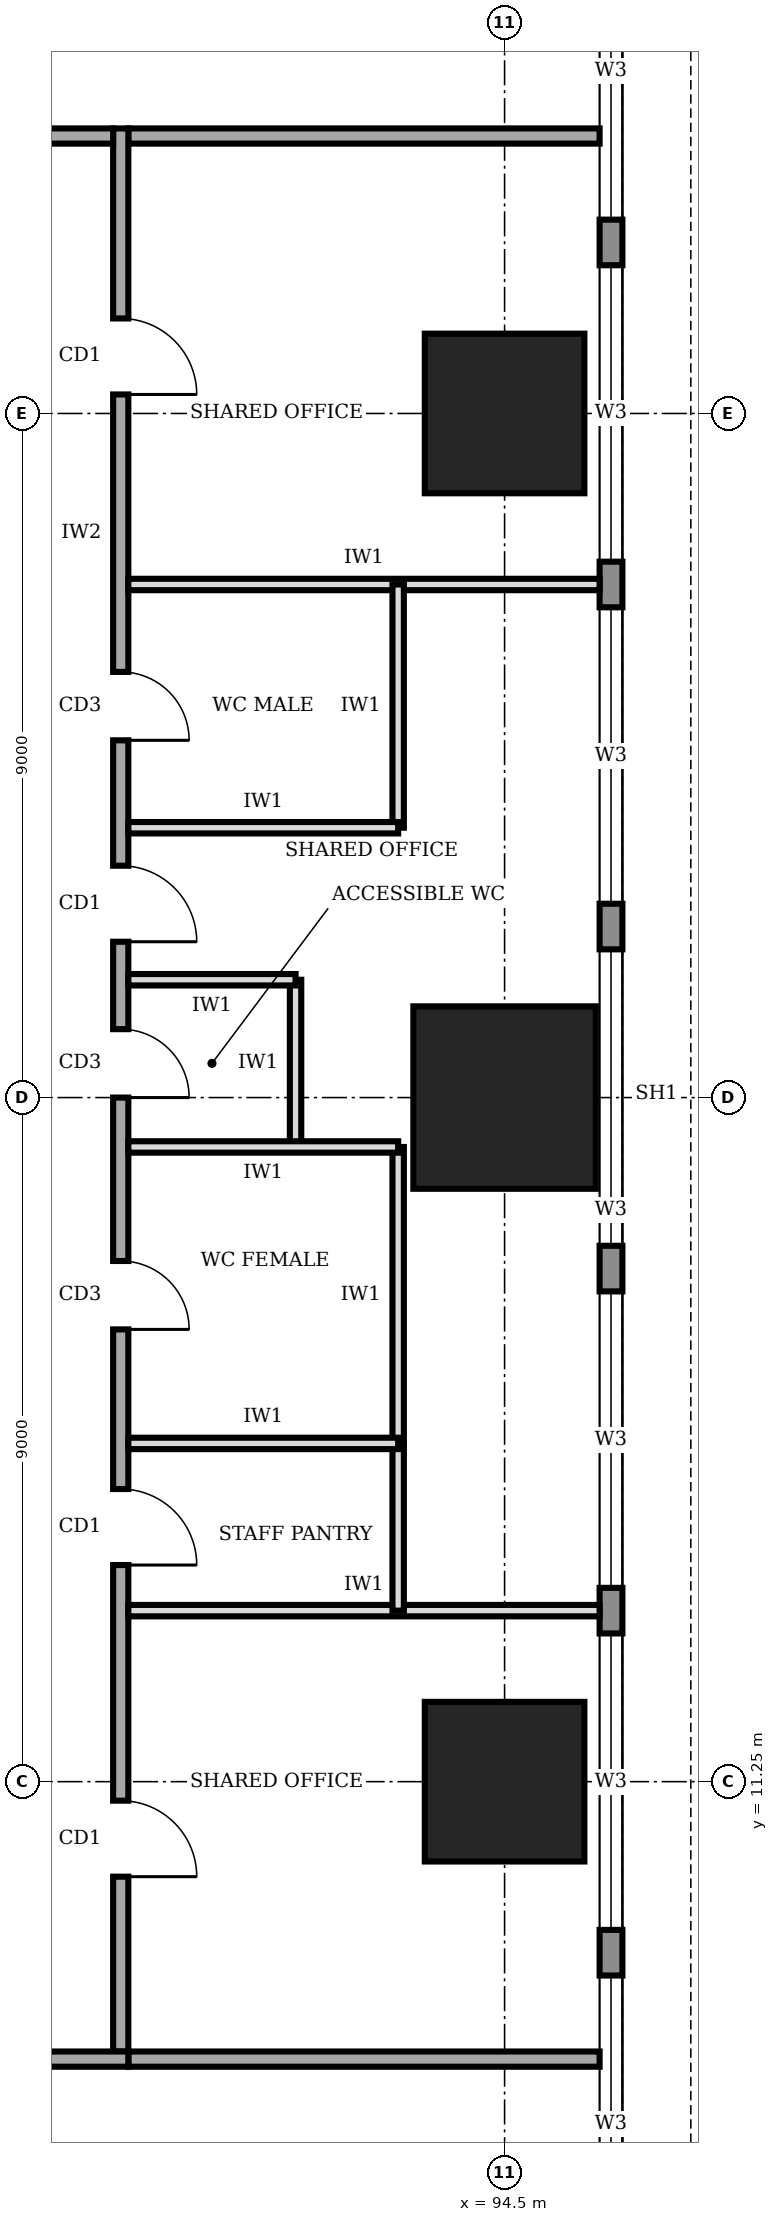
"""IFC4 building model, lengths in metres.
Left out: names, types, materials, properties, quantities, classifications, styles, units other than length and angle.
Written with IfcOpenShell. Run it as: python <this file> out.ifc"""

import sys

from ifc_helpers import new_model, si_unit, direction, frame, frame_2d, origin, origin_2d, place, context, subcontext, project, spatial, rectangle, extrude, element, fill, save


model = new_model("IFC4")
c1 = context("Model", 3, precision=1e-05, world=origin(), true_north=direction((0.0, 1.0)))
c2 = subcontext(c1, "Body", "Model", "MODEL_VIEW")
j1 = project(units=[si_unit("LENGTHUNIT", "METRE"), si_unit("PLANEANGLEUNIT", "RADIAN")], contexts=[c1])
p1 = place(None, origin())
s1 = spatial("IfcSite", under=j1, at=p1, CompositionType="ELEMENT")
p2 = place(p1, origin())
s2 = spatial("IfcBuilding", under=s1, at=p2, CompositionType="ELEMENT")
p3 = place(p2, frame((0.0, 0.0, 85.0)))
s3 = spatial("IfcBuildingStorey", under=s2, at=p3, CompositionType="ELEMENT", Elevation=85.0)
p4 = place(p3, frame((94.5, 11.25, 0.0), z_axis=(0.0, 0.0, 1.0), x_axis=(1.0, 0.0, 0.0)))
e1 = element("IfcColumn", 1, at=p4, inside=s3, PredefinedType="COLUMN", context=c2, shape_type="SweptSolid", body=[
    extrude(rectangle(XDim=2.1, YDim=2.1, at=origin_2d()), origin(), (0.0, 0.0, 1.0), 4.0),
])
p5 = place(p3, frame((94.5, 20.25, 0.0), z_axis=(0.0, 0.0, 1.0), x_axis=(1.0, 0.0, 0.0)))
e2 = element("IfcColumn", 2, at=p5, inside=s3, PredefinedType="COLUMN", context=c2, shape_type="SweptSolid", body=[
    extrude(rectangle(XDim=2.4, YDim=2.4, at=origin_2d()), origin(), (0.0, 0.0, 1.0), 4.0),
])
p6 = place(p3, frame((94.5, 29.25, 0.0), z_axis=(0.0, 0.0, 1.0), x_axis=(1.0, 0.0, 0.0)))
e3 = element("IfcColumn", 3, at=p6, inside=s3, PredefinedType="COLUMN", context=c2, shape_type="SweptSolid", body=[
    extrude(rectangle(XDim=2.1, YDim=2.1, at=origin_2d()), origin(), (0.0, 0.0, 1.0), 4.0),
])
p7 = place(p3, frame((95.9, 3.32, 0.0), z_axis=(0.0, 0.0, 1.0), x_axis=(0.0, 1.0, 0.0)))
e4 = element("IfcWall", 4, at=p7, inside=s3, PredefinedType="STANDARD", context=c2, shape_type="SweptSolid", body=[
    extrude(rectangle(XDim=33.96, YDim=0.3, at=frame_2d((16.98, 0.0))), origin(), (0.0, 0.0, 1.0), 3.75),
])
p8 = place(p7, frame((1.48, 0.0, 0.95)))
e5 = element("IfcOpeningElement", 5, at=p8, cuts=e4, PredefinedType="OPENING", context=c2, shape_type="SweptSolid", body=[
    extrude(rectangle(XDim=3.9, YDim=1.8, at=frame_2d((1.95, 0.9))), frame((0.0, 0.16, 0.0), z_axis=(0.0, -1.0, 0.0), x_axis=(1.0, 0.0, 0.0)), (0.0, 0.0, 1.0), 0.32),
])
p9 = place(p7, frame((5.98, 0.0, 0.95)))
e6 = element("IfcOpeningElement", 6, at=p9, cuts=e4, PredefinedType="OPENING", context=c2, shape_type="SweptSolid", body=[
    extrude(rectangle(XDim=3.9, YDim=1.8, at=frame_2d((1.95, 0.9))), frame((0.0, 0.16, 0.0), z_axis=(0.0, -1.0, 0.0), x_axis=(1.0, 0.0, 0.0)), (0.0, 0.0, 1.0), 0.32),
])
p10 = place(p7, frame((10.48, 0.0, 0.95)))
e7 = element("IfcOpeningElement", 7, at=p10, cuts=e4, PredefinedType="OPENING", context=c2, shape_type="SweptSolid", body=[
    extrude(rectangle(XDim=3.9, YDim=1.8, at=frame_2d((1.95, 0.9))), frame((0.0, 0.16, 0.0), z_axis=(0.0, -1.0, 0.0), x_axis=(1.0, 0.0, 0.0)), (0.0, 0.0, 1.0), 0.32),
])
p11 = place(p7, frame((14.98, 0.0, 0.95)))
e8 = element("IfcOpeningElement", 8, at=p11, cuts=e4, PredefinedType="OPENING", context=c2, shape_type="SweptSolid", body=[
    extrude(rectangle(XDim=3.9, YDim=1.8, at=frame_2d((1.95, 0.9))), frame((0.0, 0.16, 0.0), z_axis=(0.0, -1.0, 0.0), x_axis=(1.0, 0.0, 0.0)), (0.0, 0.0, 1.0), 0.32),
])
p12 = place(p7, frame((19.48, 0.0, 0.95)))
e9 = element("IfcOpeningElement", 9, at=p12, cuts=e4, PredefinedType="OPENING", context=c2, shape_type="SweptSolid", body=[
    extrude(rectangle(XDim=3.9, YDim=1.8, at=frame_2d((1.95, 0.9))), frame((0.0, 0.16, 0.0), z_axis=(0.0, -1.0, 0.0), x_axis=(1.0, 0.0, 0.0)), (0.0, 0.0, 1.0), 0.32),
])
p13 = place(p7, frame((23.98, 0.0, 0.95)))
e10 = element("IfcOpeningElement", 10, at=p13, cuts=e4, PredefinedType="OPENING", context=c2, shape_type="SweptSolid", body=[
    extrude(rectangle(XDim=3.9, YDim=1.8, at=frame_2d((1.95, 0.9))), frame((0.0, 0.16, 0.0), z_axis=(0.0, -1.0, 0.0), x_axis=(1.0, 0.0, 0.0)), (0.0, 0.0, 1.0), 0.32),
])
p14 = place(p7, frame((28.48, 0.0, 0.95)))
e11 = element("IfcOpeningElement", 11, at=p14, cuts=e4, PredefinedType="OPENING", context=c2, shape_type="SweptSolid", body=[
    extrude(rectangle(XDim=3.9, YDim=1.8, at=frame_2d((1.95, 0.9))), frame((0.0, 0.16, 0.0), z_axis=(0.0, -1.0, 0.0), x_axis=(1.0, 0.0, 0.0)), (0.0, 0.0, 1.0), 0.32),
])
p15 = place(p3, frame((63.3, 7.6, 0.0), z_axis=(0.0, 0.0, 1.0), x_axis=(1.0, 0.0, 0.0)))
e12 = element("IfcWall", 12, at=p15, inside=s3, PredefinedType="SOLIDWALL", context=c2, shape_type="SweptSolid", body=[
    extrude(rectangle(XDim=26.25, YDim=0.2, at=frame_2d((13.125, 0.0))), origin(), (0.0, 0.0, 1.0), 3.75),
])
p16 = place(p15, frame((6.0, 0.0, 0.0)))
e13 = element("IfcOpeningElement", 13, at=p16, cuts=e12, PredefinedType="OPENING", context=c2, shape_type="SweptSolid", body=[
    extrude(rectangle(XDim=1.0, YDim=2.1, at=frame_2d((0.5, 1.05))), frame((0.0, 0.11, 0.0), z_axis=(0.0, -1.0, 0.0), x_axis=(1.0, 0.0, 0.0)), (0.0, 0.0, 1.0), 0.22),
])
p17 = place(p15, frame((19.325, 0.0, 0.0)))
e14 = element("IfcOpeningElement", 14, at=p17, cuts=e12, PredefinedType="OPENING", context=c2, shape_type="SweptSolid", body=[
    extrude(rectangle(XDim=1.0, YDim=2.1, at=frame_2d((0.5, 1.05))), frame((0.0, 0.11, 0.0), z_axis=(0.0, -1.0, 0.0), x_axis=(1.0, 0.0, 0.0)), (0.0, 0.0, 1.0), 0.22),
])
p18 = place(p3, frame((89.45, 7.7, 0.0), z_axis=(0.0, 0.0, 1.0), x_axis=(0.0, 1.0, 0.0)))
e15 = element("IfcWall", 15, at=p18, inside=s3, PredefinedType="SOLIDWALL", context=c2, shape_type="SweptSolid", body=[
    extrude(rectangle(XDim=25.3, YDim=0.2, at=frame_2d((12.65, 0.0))), origin(), (0.0, 0.0, 1.0), 3.75),
])
p19 = place(p18, frame((2.3, 0.0, 0.0)))
e16 = element("IfcOpeningElement", 16, at=p19, cuts=e15, PredefinedType="OPENING", context=c2, shape_type="SweptSolid", body=[
    extrude(rectangle(XDim=1.0, YDim=2.1, at=frame_2d((0.5, 1.05))), frame((0.0, 0.11, 0.0), z_axis=(0.0, -1.0, 0.0), x_axis=(1.0, 0.0, 0.0)), (0.0, 0.0, 1.0), 0.22),
])
p20 = place(p18, frame((6.4, 0.0, 0.0)))
e17 = element("IfcOpeningElement", 17, at=p20, cuts=e15, PredefinedType="OPENING", context=c2, shape_type="SweptSolid", body=[
    extrude(rectangle(XDim=1.0, YDim=2.1, at=frame_2d((0.5, 1.05))), frame((0.0, 0.11, 0.0), z_axis=(0.0, -1.0, 0.0), x_axis=(1.0, 0.0, 0.0)), (0.0, 0.0, 1.0), 0.22),
])
p21 = place(p18, frame((9.5, 0.0, 0.0)))
e18 = element("IfcOpeningElement", 18, at=p21, cuts=e15, PredefinedType="OPENING", context=c2, shape_type="SweptSolid", body=[
    extrude(rectangle(XDim=0.9, YDim=2.1, at=frame_2d((0.45, 1.05))), frame((0.0, 0.11, 0.0), z_axis=(0.0, -1.0, 0.0), x_axis=(1.0, 0.0, 0.0)), (0.0, 0.0, 1.0), 0.22),
])
p22 = place(p18, frame((12.55, 0.0, 0.0)))
e19 = element("IfcOpeningElement", 19, at=p22, cuts=e15, PredefinedType="OPENING", context=c2, shape_type="SweptSolid", body=[
    extrude(rectangle(XDim=0.9, YDim=2.1, at=frame_2d((0.45, 1.05))), frame((0.0, 0.11, 0.0), z_axis=(0.0, -1.0, 0.0), x_axis=(1.0, 0.0, 0.0)), (0.0, 0.0, 1.0), 0.22),
])
p23 = place(p18, frame((17.25, 0.0, 0.0)))
e20 = element("IfcOpeningElement", 20, at=p23, cuts=e15, PredefinedType="OPENING", context=c2, shape_type="SweptSolid", body=[
    extrude(rectangle(XDim=0.9, YDim=2.1, at=frame_2d((0.45, 1.05))), frame((0.0, 0.11, 0.0), z_axis=(0.0, -1.0, 0.0), x_axis=(1.0, 0.0, 0.0)), (0.0, 0.0, 1.0), 0.22),
])
p24 = place(p18, frame((14.6, 0.0, 0.0)))
e21 = element("IfcOpeningElement", 21, at=p24, cuts=e15, PredefinedType="OPENING", context=c2, shape_type="SweptSolid", body=[
    extrude(rectangle(XDim=1.0, YDim=2.1, at=frame_2d((0.5, 1.05))), frame((0.0, 0.11, 0.0), z_axis=(0.0, -1.0, 0.0), x_axis=(1.0, 0.0, 0.0)), (0.0, 0.0, 1.0), 0.22),
])
p25 = place(p18, frame((21.8, 0.0, 0.0)))
e22 = element("IfcOpeningElement", 22, at=p25, cuts=e15, PredefinedType="OPENING", context=c2, shape_type="SweptSolid", body=[
    extrude(rectangle(XDim=1.0, YDim=2.1, at=frame_2d((0.5, 1.05))), frame((0.0, 0.11, 0.0), z_axis=(0.0, -1.0, 0.0), x_axis=(1.0, 0.0, 0.0)), (0.0, 0.0, 1.0), 0.22),
])
p26 = place(p3, frame((89.35, 32.9, 0.0), z_axis=(0.0, 0.0, 1.0), x_axis=(-1.0, 0.0, 0.0)))
e23 = element("IfcWall", 23, at=p26, inside=s3, PredefinedType="SOLIDWALL", context=c2, shape_type="SweptSolid", body=[
    extrude(rectangle(XDim=26.05, YDim=0.2, at=frame_2d((13.025, 0.0))), origin(), (0.0, 0.0, 1.0), 3.75),
])
p27 = place(p26, frame((19.05, 0.0, 0.0)))
e24 = element("IfcOpeningElement", 24, at=p27, cuts=e23, PredefinedType="OPENING", context=c2, shape_type="SweptSolid", body=[
    extrude(rectangle(XDim=1.0, YDim=2.1, at=frame_2d((0.5, 1.05))), frame((0.0, 0.11, 0.0), z_axis=(0.0, -1.0, 0.0), x_axis=(1.0, 0.0, 0.0)), (0.0, 0.0, 1.0), 0.22),
])
p28 = place(p26, frame((7.85, 0.0, 0.0)))
e25 = element("IfcOpeningElement", 25, at=p28, cuts=e23, PredefinedType="OPENING", context=c2, shape_type="SweptSolid", body=[
    extrude(rectangle(XDim=1.0, YDim=2.1, at=frame_2d((0.5, 1.05))), frame((0.0, 0.11, 0.0), z_axis=(0.0, -1.0, 0.0), x_axis=(1.0, 0.0, 0.0)), (0.0, 0.0, 1.0), 0.22),
])
p29 = place(p26, frame((1.325, 0.0, 0.0)))
e26 = element("IfcOpeningElement", 26, at=p29, cuts=e23, PredefinedType="OPENING", context=c2, shape_type="SweptSolid", body=[
    extrude(rectangle(XDim=1.0, YDim=2.1, at=frame_2d((0.5, 1.05))), frame((0.0, 0.11, 0.0), z_axis=(0.0, -1.0, 0.0), x_axis=(1.0, 0.0, 0.0)), (0.0, 0.0, 1.0), 0.22),
])
for number, where, z_axis, x_axis in (
    (27, (89.55, 7.6, 0.0), (0.0, 0.0, 1.0), (1.0, 0.0, 0.0)),
    (28, (89.55, 32.9, 0.0), (0.0, 0.0, 1.0), (1.0, 0.0, 0.0)),
):
    element("IfcWall", number, at=place(p3, frame(where, z_axis=z_axis, x_axis=x_axis)), inside=s3, PredefinedType="SOLIDWALL", context=c2, shape_type="SweptSolid", body=[
        extrude(rectangle(XDim=6.2, YDim=0.2, at=frame_2d((3.1, 0.0))), origin(), (0.0, 0.0, 1.0), 3.75),
    ])
for number, where, z_axis, x_axis in (
    (29, (89.55, 13.5, 0.0), (0.0, 0.0, 1.0), (1.0, 0.0, 0.0)),
    (30, (89.55, 27.0, 0.0), (0.0, 0.0, 1.0), (1.0, 0.0, 0.0)),
):
    element("IfcWall", number, at=place(p3, frame(where, z_axis=z_axis, x_axis=x_axis)), inside=s3, PredefinedType="PARTITIONING", context=c2, shape_type="SweptSolid", body=[
        extrude(rectangle(XDim=6.2, YDim=0.15, at=frame_2d((3.1, 0.0))), origin(), (0.0, 0.0, 1.0), 3.75),
    ])
p30 = place(p3, frame((89.55, 15.7, 0.0), z_axis=(0.0, 0.0, 1.0), x_axis=(1.0, 0.0, 0.0)))
e31 = element("IfcWall", 31, at=p30, inside=s3, PredefinedType="PARTITIONING", context=c2, shape_type="SweptSolid", body=[
    extrude(rectangle(XDim=3.55, YDim=0.15, at=frame_2d((1.775, 0.0))), origin(), (0.0, 0.0, 1.0), 3.75),
])
p31 = place(p3, frame((89.55, 19.6, 0.0), z_axis=(0.0, 0.0, 1.0), x_axis=(1.0, 0.0, 0.0)))
e32 = element("IfcWall", 32, at=p31, inside=s3, PredefinedType="PARTITIONING", context=c2, shape_type="SweptSolid", body=[
    extrude(rectangle(XDim=3.55, YDim=0.15, at=frame_2d((1.775, 0.0))), origin(), (0.0, 0.0, 1.0), 2.85),
])
p32 = place(p3, frame((89.55, 21.8, 0.0), z_axis=(0.0, 0.0, 1.0), x_axis=(1.0, 0.0, 0.0)))
e33 = element("IfcWall", 33, at=p32, inside=s3, PredefinedType="PARTITIONING", context=c2, shape_type="SweptSolid", body=[
    extrude(rectangle(XDim=2.2, YDim=0.15, at=frame_2d((1.1, 0.0))), origin(), (0.0, 0.0, 1.0), 3.75),
])
p33 = place(p3, frame((89.55, 23.8, 0.0), z_axis=(0.0, 0.0, 1.0), x_axis=(1.0, 0.0, 0.0)))
e34 = element("IfcWall", 34, at=p33, inside=s3, PredefinedType="PARTITIONING", context=c2, shape_type="SweptSolid", body=[
    extrude(rectangle(XDim=3.55, YDim=0.15, at=frame_2d((1.775, 0.0))), origin(), (0.0, 0.0, 1.0), 3.75),
])
p34 = place(p3, frame((93.1, 13.5, 0.0), z_axis=(0.0, 0.0, 1.0), x_axis=(0.0, 1.0, 0.0)))
e35 = element("IfcWall", 35, at=p34, inside=s3, PredefinedType="PARTITIONING", context=c2, shape_type="SweptSolid", body=[
    extrude(rectangle(XDim=2.2, YDim=0.15, at=frame_2d((1.1, 0.0))), origin(), (0.0, 0.0, 1.0), 3.75),
])
p35 = place(p3, frame((93.1, 15.7, 0.0), z_axis=(0.0, 0.0, 1.0), x_axis=(0.0, 1.0, 0.0)))
e36 = element("IfcWall", 36, at=p35, inside=s3, PredefinedType="PARTITIONING", context=c2, shape_type="SweptSolid", body=[
    extrude(rectangle(XDim=3.9, YDim=0.15, at=frame_2d((1.95, 0.0))), origin(), (0.0, 0.0, 1.0), 3.75),
])
p36 = place(p3, frame((91.75, 19.6, 0.0), z_axis=(0.0, 0.0, 1.0), x_axis=(0.0, 1.0, 0.0)))
e37 = element("IfcWall", 37, at=p36, inside=s3, PredefinedType="PARTITIONING", context=c2, shape_type="SweptSolid", body=[
    extrude(rectangle(XDim=2.2, YDim=0.15, at=frame_2d((1.1, 0.0))), origin(), (0.0, 0.0, 1.0), 3.75),
])
p37 = place(p3, frame((93.1, 23.8, 0.0), z_axis=(0.0, 0.0, 1.0), x_axis=(0.0, 1.0, 0.0)))
e38 = element("IfcWall", 38, at=p37, inside=s3, PredefinedType="PARTITIONING", context=c2, shape_type="SweptSolid", body=[
    extrude(rectangle(XDim=3.2, YDim=0.15, at=frame_2d((1.6, 0.0))), origin(), (0.0, 0.0, 1.0), 3.75),
])
p38 = place(p8, origin())
e39 = element("IfcWindow", 39, at=p38, inside=s3, PartitioningType="SINGLE_PANEL", PredefinedType="WINDOW", context=c2, shape_type="SweptSolid", body=[
    extrude(rectangle(XDim=3.9, YDim=1.8, at=frame_2d((1.95, 0.9))), frame((0.0, 0.03, 0.0), z_axis=(0.0, -1.0, 0.0), x_axis=(1.0, 0.0, 0.0)), (0.0, 0.0, 1.0), 0.06),
])
fill(e5, e39)
p39 = place(p9, origin())
e40 = element("IfcWindow", 40, at=p39, inside=s3, PartitioningType="SINGLE_PANEL", PredefinedType="WINDOW", context=c2, shape_type="SweptSolid", body=[
    extrude(rectangle(XDim=3.9, YDim=1.8, at=frame_2d((1.95, 0.9))), frame((0.0, 0.03, 0.0), z_axis=(0.0, -1.0, 0.0), x_axis=(1.0, 0.0, 0.0)), (0.0, 0.0, 1.0), 0.06),
])
fill(e6, e40)
p40 = place(p10, origin())
e41 = element("IfcWindow", 41, at=p40, inside=s3, PartitioningType="SINGLE_PANEL", PredefinedType="WINDOW", context=c2, shape_type="SweptSolid", body=[
    extrude(rectangle(XDim=3.9, YDim=1.8, at=frame_2d((1.95, 0.9))), frame((0.0, 0.03, 0.0), z_axis=(0.0, -1.0, 0.0), x_axis=(1.0, 0.0, 0.0)), (0.0, 0.0, 1.0), 0.06),
])
fill(e7, e41)
p41 = place(p11, origin())
e42 = element("IfcWindow", 42, at=p41, inside=s3, PartitioningType="SINGLE_PANEL", PredefinedType="WINDOW", context=c2, shape_type="SweptSolid", body=[
    extrude(rectangle(XDim=3.9, YDim=1.8, at=frame_2d((1.95, 0.9))), frame((0.0, 0.03, 0.0), z_axis=(0.0, -1.0, 0.0), x_axis=(1.0, 0.0, 0.0)), (0.0, 0.0, 1.0), 0.06),
])
fill(e8, e42)
p42 = place(p12, origin())
e43 = element("IfcWindow", 43, at=p42, inside=s3, PartitioningType="SINGLE_PANEL", PredefinedType="WINDOW", context=c2, shape_type="SweptSolid", body=[
    extrude(rectangle(XDim=3.9, YDim=1.8, at=frame_2d((1.95, 0.9))), frame((0.0, 0.03, 0.0), z_axis=(0.0, -1.0, 0.0), x_axis=(1.0, 0.0, 0.0)), (0.0, 0.0, 1.0), 0.06),
])
fill(e9, e43)
p43 = place(p13, origin())
e44 = element("IfcWindow", 44, at=p43, inside=s3, PartitioningType="SINGLE_PANEL", PredefinedType="WINDOW", context=c2, shape_type="SweptSolid", body=[
    extrude(rectangle(XDim=3.9, YDim=1.8, at=frame_2d((1.95, 0.9))), frame((0.0, 0.03, 0.0), z_axis=(0.0, -1.0, 0.0), x_axis=(1.0, 0.0, 0.0)), (0.0, 0.0, 1.0), 0.06),
])
fill(e10, e44)
p44 = place(p14, origin())
e45 = element("IfcWindow", 45, at=p44, inside=s3, PartitioningType="SINGLE_PANEL", PredefinedType="WINDOW", context=c2, shape_type="SweptSolid", body=[
    extrude(rectangle(XDim=3.9, YDim=1.8, at=frame_2d((1.95, 0.9))), frame((0.0, 0.03, 0.0), z_axis=(0.0, -1.0, 0.0), x_axis=(1.0, 0.0, 0.0)), (0.0, 0.0, 1.0), 0.06),
])
fill(e11, e45)
p45 = place(p19, frame((1.0, 0.0, 0.0), z_axis=(0.0, 0.0, 1.0), x_axis=(-1.0, 0.0, 0.0)))
e46 = element("IfcDoor", 46, at=p45, inside=s3, OperationType="SINGLE_SWING_RIGHT", PredefinedType="DOOR", context=c2, shape_type="SweptSolid", body=[
    extrude(rectangle(XDim=1.0, YDim=2.1, at=frame_2d((0.5, 1.05))), frame((0.0, 0.025, 0.0), z_axis=(0.0, -1.0, 0.0), x_axis=(1.0, 0.0, 0.0)), (0.0, 0.0, 1.0), 0.05),
])
fill(e16, e46)
p46 = place(p20, frame((1.0, 0.0, 0.0), z_axis=(0.0, 0.0, 1.0), x_axis=(-1.0, 0.0, 0.0)))
e47 = element("IfcDoor", 47, at=p46, inside=s3, OperationType="SINGLE_SWING_RIGHT", PredefinedType="DOOR", context=c2, shape_type="SweptSolid", body=[
    extrude(rectangle(XDim=1.0, YDim=2.1, at=frame_2d((0.5, 1.05))), frame((0.0, 0.025, 0.0), z_axis=(0.0, -1.0, 0.0), x_axis=(1.0, 0.0, 0.0)), (0.0, 0.0, 1.0), 0.05),
])
fill(e17, e47)
p47 = place(p21, frame((0.9, 0.0, 0.0), z_axis=(0.0, 0.0, 1.0), x_axis=(-1.0, 0.0, 0.0)))
e48 = element("IfcDoor", 48, at=p47, inside=s3, OperationType="SINGLE_SWING_RIGHT", PredefinedType="DOOR", context=c2, shape_type="SweptSolid", body=[
    extrude(rectangle(XDim=0.9, YDim=2.1, at=frame_2d((0.45, 1.05))), frame((0.0, 0.025, 0.0), z_axis=(0.0, -1.0, 0.0), x_axis=(1.0, 0.0, 0.0)), (0.0, 0.0, 1.0), 0.05),
])
fill(e18, e48)
p48 = place(p22, frame((0.9, 0.0, 0.0), z_axis=(0.0, 0.0, 1.0), x_axis=(-1.0, 0.0, 0.0)))
e49 = element("IfcDoor", 49, at=p48, inside=s3, OperationType="SINGLE_SWING_RIGHT", PredefinedType="DOOR", context=c2, shape_type="SweptSolid", body=[
    extrude(rectangle(XDim=0.9, YDim=2.1, at=frame_2d((0.45, 1.05))), frame((0.0, 0.025, 0.0), z_axis=(0.0, -1.0, 0.0), x_axis=(1.0, 0.0, 0.0)), (0.0, 0.0, 1.0), 0.05),
])
fill(e19, e49)
p49 = place(p23, frame((0.9, 0.0, 0.0), z_axis=(0.0, 0.0, 1.0), x_axis=(-1.0, 0.0, 0.0)))
e50 = element("IfcDoor", 50, at=p49, inside=s3, OperationType="SINGLE_SWING_RIGHT", PredefinedType="DOOR", context=c2, shape_type="SweptSolid", body=[
    extrude(rectangle(XDim=0.9, YDim=2.1, at=frame_2d((0.45, 1.05))), frame((0.0, 0.025, 0.0), z_axis=(0.0, -1.0, 0.0), x_axis=(1.0, 0.0, 0.0)), (0.0, 0.0, 1.0), 0.05),
])
fill(e20, e50)
p50 = place(p24, frame((1.0, 0.0, 0.0), z_axis=(0.0, 0.0, 1.0), x_axis=(-1.0, 0.0, 0.0)))
e51 = element("IfcDoor", 51, at=p50, inside=s3, OperationType="SINGLE_SWING_RIGHT", PredefinedType="DOOR", context=c2, shape_type="SweptSolid", body=[
    extrude(rectangle(XDim=1.0, YDim=2.1, at=frame_2d((0.5, 1.05))), frame((0.0, 0.025, 0.0), z_axis=(0.0, -1.0, 0.0), x_axis=(1.0, 0.0, 0.0)), (0.0, 0.0, 1.0), 0.05),
])
fill(e21, e51)
p51 = place(p25, frame((1.0, 0.0, 0.0), z_axis=(0.0, 0.0, 1.0), x_axis=(-1.0, 0.0, 0.0)))
e52 = element("IfcDoor", 52, at=p51, inside=s3, OperationType="SINGLE_SWING_RIGHT", PredefinedType="DOOR", context=c2, shape_type="SweptSolid", body=[
    extrude(rectangle(XDim=1.0, YDim=2.1, at=frame_2d((0.5, 1.05))), frame((0.0, 0.025, 0.0), z_axis=(0.0, -1.0, 0.0), x_axis=(1.0, 0.0, 0.0)), (0.0, 0.0, 1.0), 0.05),
])
fill(e22, e52)
save(model, sys.argv[1])
